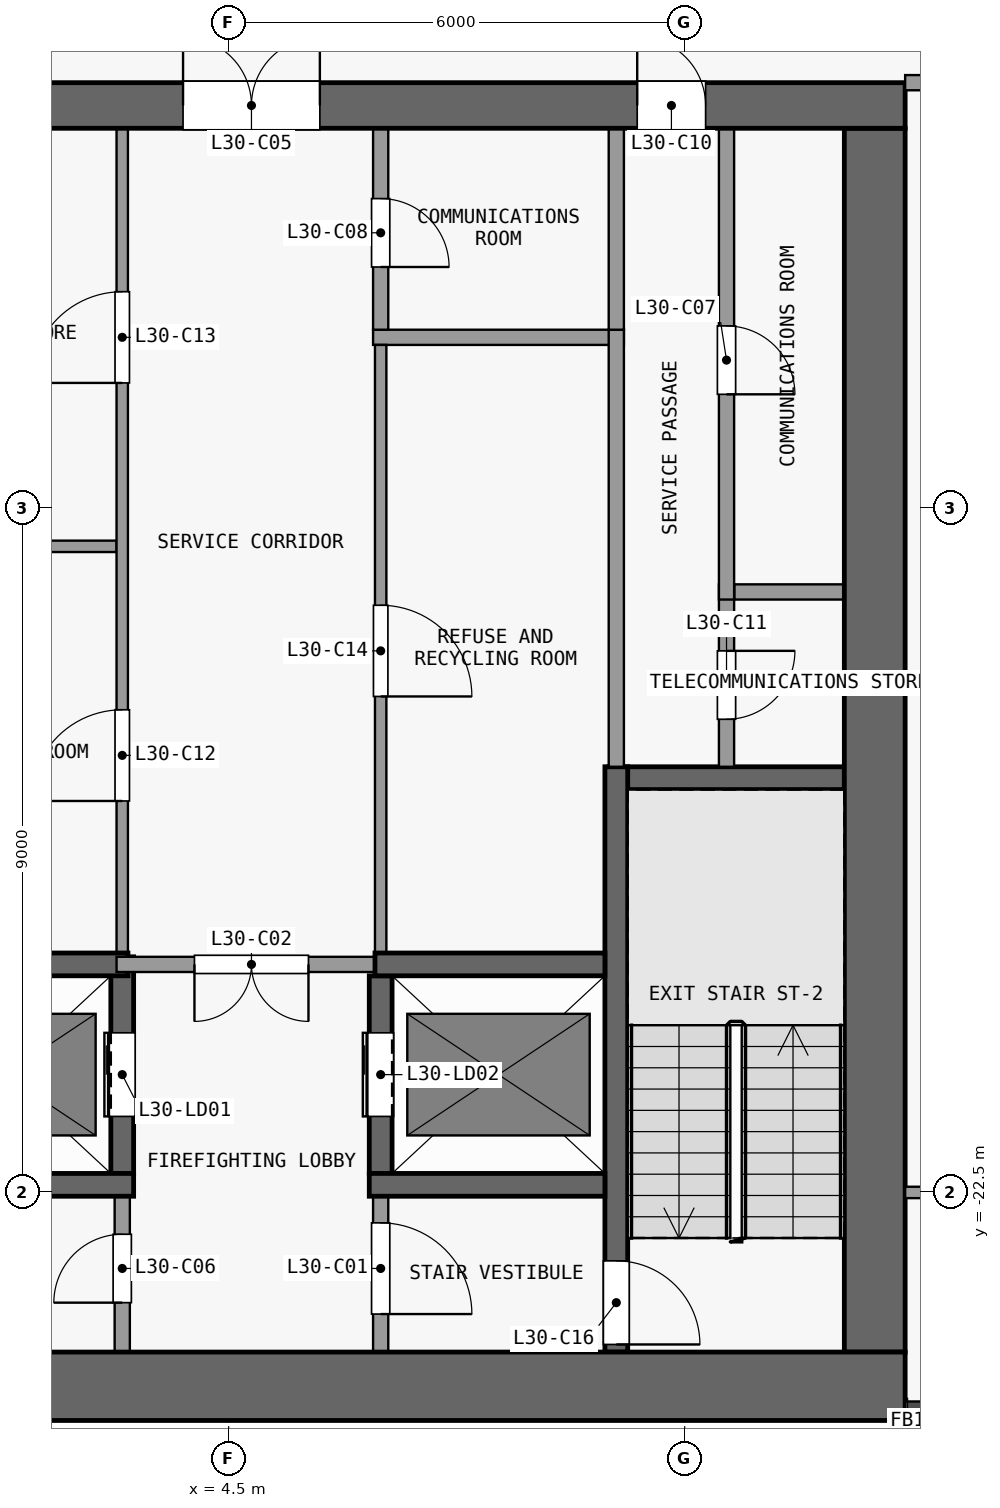
"""IFC4 building model, lengths in metres.
Left out: names, types, materials, properties, quantities, classifications, styles, units other than length and angle.
Written with IfcOpenShell. Run it as: python <this file> out.ifc"""

import sys

from ifc_helpers import new_model, si_unit, direction, frame, frame_2d, origin, place, context, subcontext, project, spatial, rectangle, extrude, element, fill, save


model = new_model("IFC4")
c1 = context("Model", 3, precision=1e-05, world=origin(), true_north=direction((0.0, 1.0)))
c2 = subcontext(c1, "Body", "Model", "MODEL_VIEW")
j1 = project(units=[si_unit("LENGTHUNIT", "METRE"), si_unit("PLANEANGLEUNIT", "RADIAN")], contexts=[c1])
p1 = place(None, origin())
s1 = spatial("IfcSite", under=j1, at=p1, CompositionType="ELEMENT")
p2 = place(p1, origin())
s2 = spatial("IfcBuilding", under=s1, at=p2, CompositionType="ELEMENT")
p3 = place(p2, frame((0.0, 0.0, 120.7)))
s3 = spatial("IfcBuildingStorey", under=s2, at=p3, CompositionType="ELEMENT", Elevation=120.7)
p4 = place(p3, frame((-13.4, -25.05, 0.0), z_axis=(0.0, 0.0, 1.0), x_axis=(1.0, 0.0, 0.0)))
e1 = element("IfcWall", 1, at=p4, inside=s3, PredefinedType="SHEAR", context=c2, shape_type="SweptSolid", body=[
    extrude(rectangle(XDim=26.8, YDim=0.9, at=frame_2d((13.4, 0.0))), origin(), (0.0, 0.0, 1.0), 3.3),
])
p5 = place(p3, frame((-13.4, -8.2, 0.0), z_axis=(0.0, 0.0, 1.0), x_axis=(1.0, 0.0, 0.0)))
e2 = element("IfcWall", 2, at=p5, inside=s3, PredefinedType="SHEAR", context=c2, shape_type="SweptSolid", body=[
    extrude(rectangle(XDim=26.8, YDim=0.6, at=frame_2d((13.4, 0.0))), origin(), (0.0, 0.0, 1.0), 3.3),
])
p6 = place(p5, frame((7.7, 0.0, 0.0)))
e3 = element("IfcOpeningElement", 3, at=p6, cuts=e2, PredefinedType="OPENING", context=c2, shape_type="SweptSolid", body=[
    extrude(rectangle(XDim=1.8, YDim=2.1, at=frame_2d((0.9, 1.05))), frame((0.0, 0.31, 0.0), z_axis=(0.0, -1.0, 0.0), x_axis=(1.0, 0.0, 0.0)), (0.0, 0.0, 1.0), 0.62),
])
p7 = place(p5, frame((17.3, 0.0, 0.0)))
e4 = element("IfcOpeningElement", 4, at=p7, cuts=e2, PredefinedType="OPENING", context=c2, shape_type="SweptSolid", body=[
    extrude(rectangle(XDim=1.8, YDim=2.1, at=frame_2d((0.9, 1.05))), frame((0.0, 0.31, 0.0), z_axis=(0.0, -1.0, 0.0), x_axis=(1.0, 0.0, 0.0)), (0.0, 0.0, 1.0), 0.62),
])
p8 = place(p5, frame((1.625, 0.0, 0.0)))
e5 = element("IfcOpeningElement", 5, at=p8, cuts=e2, PredefinedType="OPENING", context=c2, shape_type="SweptSolid", body=[
    extrude(rectangle(XDim=1.2, YDim=2.1, at=frame_2d((0.6, 1.05))), frame((0.0, 0.31, 0.0), z_axis=(0.0, -1.0, 0.0), x_axis=(1.0, 0.0, 0.0)), (0.0, 0.0, 1.0), 0.62),
])
p9 = place(p5, frame((23.275, 0.0, 0.0)))
e6 = element("IfcOpeningElement", 6, at=p9, cuts=e2, PredefinedType="OPENING", context=c2, shape_type="SweptSolid", body=[
    extrude(rectangle(XDim=0.9, YDim=2.1, at=frame_2d((0.45, 1.05))), frame((0.0, 0.31, 0.0), z_axis=(0.0, -1.0, 0.0), x_axis=(1.0, 0.0, 0.0)), (0.0, 0.0, 1.0), 0.62),
])
p10 = place(p3, frame((13.0, -24.6, 0.0), z_axis=(0.0, 0.0, 1.0), x_axis=(0.0, 1.0, 0.0)))
e7 = element("IfcWall", 7, at=p10, inside=s3, PredefinedType="SHEAR", context=c2, shape_type="SweptSolid", body=[
    extrude(rectangle(XDim=16.1, YDim=0.8, at=frame_2d((8.05, 0.0))), origin(), (0.0, 0.0, 1.0), 3.3),
])
p11 = place(p3, frame((-2.95, -22.4, 0.0), z_axis=(0.0, 0.0, 1.0), x_axis=(1.0, 0.0, 0.0)))
e8 = element("IfcWall", 8, at=p11, inside=s3, PredefinedType="SHEAR", context=c2, shape_type="SweptSolid", body=[
    extrude(rectangle(XDim=6.2, YDim=0.3, at=frame_2d((3.1, 0.0))), origin(), (0.0, 0.0, 1.0), 3.3),
])
p12 = place(p3, frame((6.35, -22.4, 0.0), z_axis=(0.0, 0.0, 1.0), x_axis=(1.0, 0.0, 0.0)))
e9 = element("IfcWall", 9, at=p12, inside=s3, PredefinedType="SHEAR", context=c2, shape_type="SweptSolid", body=[
    extrude(rectangle(XDim=3.1, YDim=0.3, at=frame_2d((1.55, 0.0))), origin(), (0.0, 0.0, 1.0), 3.3),
])
p13 = place(p3, frame((0.15, -19.5, 0.0), z_axis=(0.0, 0.0, 1.0), x_axis=(1.0, 0.0, 0.0)))
e10 = element("IfcWall", 10, at=p13, inside=s3, PredefinedType="SHEAR", context=c2, shape_type="SweptSolid", body=[
    extrude(rectangle(XDim=3.025, YDim=0.3, at=frame_2d((1.513, 0.0))), origin(), (0.0, 0.0, 1.0), 3.3),
])
p14 = place(p3, frame((6.575, -19.5, 0.0), z_axis=(0.0, 0.0, 1.0), x_axis=(-1.0, 0.0, 0.0)))
e11 = element("IfcWall", 11, at=p14, inside=s3, PredefinedType="PARTITIONING", context=c2, shape_type="SweptSolid", body=[
    extrude(rectangle(XDim=3.55, YDim=0.2, at=frame_2d((1.775, 0.0))), origin(), (0.0, 0.0, 1.0), 3.3),
])
p15 = place(p14, frame((1.025, 0.0, 0.0)))
e12 = element("IfcOpeningElement", 12, at=p15, cuts=e11, PredefinedType="OPENING", context=c2, shape_type="SweptSolid", body=[
    extrude(rectangle(XDim=1.5, YDim=2.1, at=frame_2d((0.75, 1.05))), frame((0.0, 0.11, 0.0), z_axis=(0.0, -1.0, 0.0), x_axis=(1.0, 0.0, 0.0)), (0.0, 0.0, 1.0), 0.22),
])
p16 = place(p3, frame((6.425, -19.5, 0.0), z_axis=(0.0, 0.0, 1.0), x_axis=(1.0, 0.0, 0.0)))
e13 = element("IfcWall", 13, at=p16, inside=s3, PredefinedType="SHEAR", context=c2, shape_type="SweptSolid", body=[
    extrude(rectangle(XDim=3.025, YDim=0.3, at=frame_2d((1.512, 0.0))), origin(), (0.0, 0.0, 1.0), 3.3),
])
p17 = place(p3, frame((9.5, -17.05, 0.0), z_axis=(0.0, 0.0, 1.0), x_axis=(1.0, 0.0, 0.0)))
e14 = element("IfcWall", 14, at=p17, inside=s3, PredefinedType="SHEAR", context=c2, shape_type="SweptSolid", body=[
    extrude(rectangle(XDim=3.1, YDim=0.3, at=frame_2d((1.55, 0.0))), origin(), (0.0, 0.0, 1.0), 3.3),
])
p18 = place(p3, frame((11.15, -14.6, 0.0), z_axis=(0.0, 0.0, 1.0), x_axis=(1.0, 0.0, 0.0)))
e15 = element("IfcWall", 15, at=p18, inside=s3, PredefinedType="PARTITIONING", context=c2, shape_type="SweptSolid", body=[
    extrude(rectangle(XDim=1.45, YDim=0.2, at=frame_2d((0.725, 0.0))), origin(), (0.0, 0.0, 1.0), 3.3),
])
p19 = place(p3, frame((0.15, -14.0, 0.0), z_axis=(0.0, 0.0, 1.0), x_axis=(1.0, 0.0, 0.0)))
e16 = element("IfcWall", 16, at=p19, inside=s3, PredefinedType="PARTITIONING", context=c2, shape_type="SweptSolid", body=[
    extrude(rectangle(XDim=2.875, YDim=0.15, at=frame_2d((1.438, 0.0))), origin(), (0.0, 0.0, 1.0), 3.3),
])
p20 = place(p3, frame((6.4, -11.25, 0.0), z_axis=(0.0, 0.0, 1.0), x_axis=(1.0, 0.0, 0.0)))
e17 = element("IfcWall", 17, at=p20, inside=s3, PredefinedType="PARTITIONING", context=c2, shape_type="SweptSolid", body=[
    extrude(rectangle(XDim=3.3, YDim=0.2, at=frame_2d((1.65, 0.0))), origin(), (0.0, 0.0, 1.0), 3.3),
])
p21 = place(p3, frame((3.1, -24.6, 0.0), z_axis=(0.0, 0.0, 1.0), x_axis=(0.0, 1.0, 0.0)))
e18 = element("IfcWall", 18, at=p21, inside=s3, PredefinedType="PARTITIONING", context=c2, shape_type="SweptSolid", body=[
    extrude(rectangle(XDim=2.05, YDim=0.2, at=frame_2d((1.025, 0.0))), origin(), (0.0, 0.0, 1.0), 3.3),
])
p22 = place(p21, frame((0.65, 0.0, 0.0)))
e19 = element("IfcOpeningElement", 19, at=p22, cuts=e18, PredefinedType="OPENING", context=c2, shape_type="SweptSolid", body=[
    extrude(rectangle(XDim=0.9, YDim=2.1, at=frame_2d((0.45, 1.05))), frame((0.0, 0.11, 0.0), z_axis=(0.0, -1.0, 0.0), x_axis=(1.0, 0.0, 0.0)), (0.0, 0.0, 1.0), 0.22),
])
p23 = place(p3, frame((3.1, -22.25, 0.0), z_axis=(0.0, 0.0, 1.0), x_axis=(0.0, 1.0, 0.0)))
e20 = element("IfcWall", 20, at=p23, inside=s3, PredefinedType="SHEAR", context=c2, shape_type="SweptSolid", body=[
    extrude(rectangle(XDim=2.85, YDim=0.3, at=frame_2d((1.425, 0.0))), origin(), (0.0, 0.0, 1.0), 3.3),
])
p24 = place(p23, frame((0.75, 0.0, 0.0)))
e21 = element("IfcOpeningElement", 21, at=p24, cuts=e20, PredefinedType="OPENING", context=c2, shape_type="SweptSolid", body=[
    extrude(rectangle(XDim=1.1, YDim=2.1, at=frame_2d((0.55, 1.05))), frame((0.0, 0.16, 0.0), z_axis=(0.0, -1.0, 0.0), x_axis=(1.0, 0.0, 0.0)), (0.0, 0.0, 1.0), 0.32),
])
p25 = place(p3, frame((3.1, -19.4, 0.0), z_axis=(0.0, 0.0, 1.0), x_axis=(0.0, 1.0, 0.0)))
e22 = element("IfcWall", 22, at=p25, inside=s3, PredefinedType="PARTITIONING", context=c2, shape_type="SweptSolid", body=[
    extrude(rectangle(XDim=10.9, YDim=0.15, at=frame_2d((5.45, 0.0))), origin(), (0.0, 0.0, 1.0), 3.3),
])
p26 = place(p25, frame((2.05, 0.0, 0.0)))
e23 = element("IfcOpeningElement", 23, at=p26, cuts=e22, PredefinedType="OPENING", context=c2, shape_type="SweptSolid", body=[
    extrude(rectangle(XDim=1.2, YDim=2.1, at=frame_2d((0.6, 1.05))), frame((0.0, 0.085, 0.0), z_axis=(0.0, -1.0, 0.0), x_axis=(1.0, 0.0, 0.0)), (0.0, 0.0, 1.0), 0.17),
])
p27 = place(p25, frame((7.55, 0.0, 0.0)))
e24 = element("IfcOpeningElement", 24, at=p27, cuts=e22, PredefinedType="OPENING", context=c2, shape_type="SweptSolid", body=[
    extrude(rectangle(XDim=1.2, YDim=2.1, at=frame_2d((0.6, 1.05))), frame((0.0, 0.085, 0.0), z_axis=(0.0, -1.0, 0.0), x_axis=(1.0, 0.0, 0.0)), (0.0, 0.0, 1.0), 0.17),
])
p28 = place(p3, frame((6.5, -22.55, 0.0), z_axis=(0.0, 0.0, 1.0), x_axis=(0.0, -1.0, 0.0)))
e25 = element("IfcWall", 25, at=p28, inside=s3, PredefinedType="PARTITIONING", context=c2, shape_type="SweptSolid", body=[
    extrude(rectangle(XDim=2.05, YDim=0.2, at=frame_2d((1.025, 0.0))), origin(), (0.0, 0.0, 1.0), 3.3),
])
p29 = place(p28, frame((0.35, 0.0, 0.0)))
e26 = element("IfcOpeningElement", 26, at=p29, cuts=e25, PredefinedType="OPENING", context=c2, shape_type="SweptSolid", body=[
    extrude(rectangle(XDim=1.2, YDim=2.1, at=frame_2d((0.6, 1.05))), frame((0.0, 0.11, 0.0), z_axis=(0.0, -1.0, 0.0), x_axis=(1.0, 0.0, 0.0)), (0.0, 0.0, 1.0), 0.22),
])
p30 = place(p3, frame((6.5, -22.25, 0.0), z_axis=(0.0, 0.0, 1.0), x_axis=(0.0, 1.0, 0.0)))
e27 = element("IfcWall", 27, at=p30, inside=s3, PredefinedType="SHEAR", context=c2, shape_type="SweptSolid", body=[
    extrude(rectangle(XDim=2.6, YDim=0.3, at=frame_2d((1.3, 0.0))), origin(), (0.0, 0.0, 1.0), 3.3),
])
p31 = place(p30, frame((0.75, 0.0, 0.0)))
e28 = element("IfcOpeningElement", 28, at=p31, cuts=e27, PredefinedType="OPENING", context=c2, shape_type="SweptSolid", body=[
    extrude(rectangle(XDim=1.1, YDim=2.1, at=frame_2d((0.55, 1.05))), frame((0.0, 0.16, 0.0), z_axis=(0.0, -1.0, 0.0), x_axis=(1.0, 0.0, 0.0)), (0.0, 0.0, 1.0), 0.32),
])
p32 = place(p3, frame((6.5, -11.35, 0.0), z_axis=(0.0, 0.0, 1.0), x_axis=(0.0, -1.0, 0.0)))
e29 = element("IfcWall", 29, at=p32, inside=s3, PredefinedType="PARTITIONING", context=c2, shape_type="SweptSolid", body=[
    extrude(rectangle(XDim=8.0, YDim=0.15, at=frame_2d((4.0, 0.0))), origin(), (0.0, 0.0, 1.0), 3.3),
])
p33 = place(p32, frame((3.425, 0.0, 0.0)))
e30 = element("IfcOpeningElement", 30, at=p33, cuts=e29, PredefinedType="OPENING", context=c2, shape_type="SweptSolid", body=[
    extrude(rectangle(XDim=1.2, YDim=2.1, at=frame_2d((0.6, 1.05))), frame((0.0, 0.085, 0.0), z_axis=(0.0, -1.0, 0.0), x_axis=(1.0, 0.0, 0.0)), (0.0, 0.0, 1.0), 0.17),
])
p34 = place(p3, frame((6.5, -8.5, 0.0), z_axis=(0.0, 0.0, 1.0), x_axis=(0.0, -1.0, 0.0)))
e31 = element("IfcWall", 31, at=p34, inside=s3, PredefinedType="PARTITIONING", context=c2, shape_type="SweptSolid", body=[
    extrude(rectangle(XDim=2.65, YDim=0.2, at=frame_2d((1.325, 0.0))), origin(), (0.0, 0.0, 1.0), 3.3),
])
p35 = place(p34, frame((0.925, 0.0, 0.0)))
e32 = element("IfcOpeningElement", 32, at=p35, cuts=e31, PredefinedType="OPENING", context=c2, shape_type="SweptSolid", body=[
    extrude(rectangle(XDim=0.9, YDim=2.1, at=frame_2d((0.45, 1.05))), frame((0.0, 0.11, 0.0), z_axis=(0.0, -1.0, 0.0), x_axis=(1.0, 0.0, 0.0)), (0.0, 0.0, 1.0), 0.22),
])
p36 = place(p3, frame((9.6, -16.9, 0.0), z_axis=(0.0, 0.0, 1.0), x_axis=(0.0, -1.0, 0.0)))
e33 = element("IfcWall", 33, at=p36, inside=s3, PredefinedType="SHEAR", context=c2, shape_type="SweptSolid", body=[
    extrude(rectangle(XDim=7.7, YDim=0.3, at=frame_2d((3.85, 0.0))), origin(), (0.0, 0.0, 1.0), 3.3),
])
p37 = place(p36, frame((6.5, 0.0, 0.0)))
e34 = element("IfcOpeningElement", 34, at=p37, cuts=e33, PredefinedType="OPENING", context=c2, shape_type="SweptSolid", body=[
    extrude(rectangle(XDim=1.1, YDim=2.1, at=frame_2d((0.55, 1.05))), frame((0.0, 0.16, 0.0), z_axis=(0.0, -1.0, 0.0), x_axis=(1.0, 0.0, 0.0)), (0.0, 0.0, 1.0), 0.32),
])
p38 = place(p3, frame((9.6, -16.9, 0.0), z_axis=(0.0, 0.0, 1.0), x_axis=(0.0, 1.0, 0.0)))
e35 = element("IfcWall", 35, at=p38, inside=s3, PredefinedType="PARTITIONING", context=c2, shape_type="SweptSolid", body=[
    extrude(rectangle(XDim=5.75, YDim=0.2, at=frame_2d((2.875, 0.0))), origin(), (0.0, 0.0, 1.0), 3.3),
])
p39 = place(p3, frame((9.6, -11.15, 0.0), z_axis=(0.0, 0.0, 1.0), x_axis=(0.0, 1.0, 0.0)))
e36 = element("IfcWall", 36, at=p39, inside=s3, PredefinedType="PARTITIONING", context=c2, shape_type="SweptSolid", body=[
    extrude(rectangle(XDim=2.65, YDim=0.2, at=frame_2d((1.325, 0.0))), origin(), (0.0, 0.0, 1.0), 3.3),
])
p40 = place(p3, frame((11.05, -14.5, 0.0), z_axis=(0.0, 0.0, 1.0), x_axis=(0.0, -1.0, 0.0)))
e37 = element("IfcWall", 37, at=p40, inside=s3, PredefinedType="PARTITIONING", context=c2, shape_type="SweptSolid", body=[
    extrude(rectangle(XDim=2.4, YDim=0.2, at=frame_2d((1.2, 0.0))), origin(), (0.0, 0.0, 1.0), 3.3),
])
p41 = place(p40, frame((0.875, 0.0, 0.0)))
e38 = element("IfcOpeningElement", 38, at=p41, cuts=e37, PredefinedType="OPENING", context=c2, shape_type="SweptSolid", body=[
    extrude(rectangle(XDim=0.9, YDim=2.1, at=frame_2d((0.45, 1.05))), frame((0.0, 0.11, 0.0), z_axis=(0.0, -1.0, 0.0), x_axis=(1.0, 0.0, 0.0)), (0.0, 0.0, 1.0), 0.22),
])
p42 = place(p3, frame((11.05, -8.5, 0.0), z_axis=(0.0, 0.0, 1.0), x_axis=(0.0, -1.0, 0.0)))
e39 = element("IfcWall", 39, at=p42, inside=s3, PredefinedType="PARTITIONING", context=c2, shape_type="SweptSolid", body=[
    extrude(rectangle(XDim=6.2, YDim=0.2, at=frame_2d((3.1, 0.0))), origin(), (0.0, 0.0, 1.0), 3.3),
])
p43 = place(p42, frame((2.6, 0.0, 0.0)))
e40 = element("IfcOpeningElement", 40, at=p43, cuts=e39, PredefinedType="OPENING", context=c2, shape_type="SweptSolid", body=[
    extrude(rectangle(XDim=0.9, YDim=2.1, at=frame_2d((0.45, 1.05))), frame((0.0, 0.11, 0.0), z_axis=(0.0, -1.0, 0.0), x_axis=(1.0, 0.0, 0.0)), (0.0, 0.0, 1.0), 0.22),
])
p44 = place(p3, frame((13.4, -22.5, 0.0), z_axis=(0.0, 0.0, 1.0), x_axis=(1.0, 0.0, 0.0)))
e41 = element("IfcWall", 41, at=p44, inside=s3, PredefinedType="PARTITIONING", context=c2, shape_type="SweptSolid", body=[
    extrude(rectangle(XDim=2.925, YDim=0.15, at=frame_2d((1.462, 0.0))), origin(), (0.0, 0.0, 1.0), 3.3),
])
p45 = place(p44, frame((1.0, 0.0, 0.0)))
e42 = element("IfcOpeningElement", 42, at=p45, cuts=e41, PredefinedType="OPENING", context=c2, shape_type="SweptSolid", body=[
    extrude(rectangle(XDim=0.9, YDim=2.1, at=frame_2d((0.45, 1.05))), frame((0.0, 0.085, 0.0), z_axis=(0.0, -1.0, 0.0), x_axis=(1.0, 0.0, 0.0)), (0.0, 0.0, 1.0), 0.17),
])
p46 = place(p3, frame((13.4, -7.9, 0.0), z_axis=(0.0, 0.0, 1.0), x_axis=(1.0, 0.0, 0.0)))
e43 = element("IfcWall", 43, at=p46, inside=s3, PredefinedType="PARTITIONING", context=c2, shape_type="SweptSolid", body=[
    extrude(rectangle(XDim=11.85, YDim=0.2, at=frame_2d((5.925, 0.0))), origin(), (0.0, 0.0, 1.0), 3.3),
])
p47 = place(p46, frame((1.0, 0.0, 0.0)))
e44 = element("IfcOpeningElement", 44, at=p47, cuts=e43, PredefinedType="OPENING", context=c2, shape_type="SweptSolid", body=[
    extrude(rectangle(XDim=1.0, YDim=2.1, at=frame_2d((0.5, 1.05))), frame((0.0, 0.11, 0.0), z_axis=(0.0, -1.0, 0.0), x_axis=(1.0, 0.0, 0.0)), (0.0, 0.0, 1.0), 0.22),
])
p48 = place(p24, origin())
e45 = element("IfcDoor", 45, at=p48, inside=s3, OperationType="DOUBLE_DOOR_SLIDING", PredefinedType="DOOR", context=c2, shape_type="SweptSolid", body=[
    extrude(rectangle(XDim=1.1, YDim=2.1, at=frame_2d((0.55, 1.05))), frame((0.0, 0.025, 0.0), z_axis=(0.0, -1.0, 0.0), x_axis=(1.0, 0.0, 0.0)), (0.0, 0.0, 1.0), 0.05),
])
fill(e21, e45)
p49 = place(p31, origin())
e46 = element("IfcDoor", 46, at=p49, inside=s3, OperationType="DOUBLE_DOOR_SLIDING", PredefinedType="DOOR", context=c2, shape_type="SweptSolid", body=[
    extrude(rectangle(XDim=1.1, YDim=2.1, at=frame_2d((0.55, 1.05))), frame((0.0, 0.025, 0.0), z_axis=(0.0, -1.0, 0.0), x_axis=(1.0, 0.0, 0.0)), (0.0, 0.0, 1.0), 0.05),
])
fill(e28, e46)
p50 = place(p29, origin())
e47 = element("IfcDoor", 47, at=p50, inside=s3, OperationType="SINGLE_SWING_RIGHT", PredefinedType="DOOR", context=c2, shape_type="SweptSolid", body=[
    extrude(rectangle(XDim=1.2, YDim=2.1, at=frame_2d((0.6, 1.05))), frame((0.0, 0.025, 0.0), z_axis=(0.0, -1.0, 0.0), x_axis=(1.0, 0.0, 0.0)), (0.0, 0.0, 1.0), 0.05),
])
fill(e26, e47)
p51 = place(p15, origin())
e48 = element("IfcDoor", 48, at=p51, inside=s3, OperationType="DOUBLE_DOOR_SINGLE_SWING", PredefinedType="DOOR", context=c2, shape_type="SweptSolid", body=[
    extrude(rectangle(XDim=1.5, YDim=2.1, at=frame_2d((0.75, 1.05))), frame((0.0, 0.025, 0.0), z_axis=(0.0, -1.0, 0.0), x_axis=(1.0, 0.0, 0.0)), (0.0, 0.0, 1.0), 0.05),
])
fill(e12, e48)
p52 = place(p7, origin())
e49 = element("IfcDoor", 49, at=p52, inside=s3, OperationType="DOUBLE_DOOR_SINGLE_SWING", PredefinedType="DOOR", context=c2, shape_type="SweptSolid", body=[
    extrude(rectangle(XDim=1.8, YDim=2.1, at=frame_2d((0.9, 1.05))), frame((0.0, 0.025, 0.0), z_axis=(0.0, -1.0, 0.0), x_axis=(1.0, 0.0, 0.0)), (0.0, 0.0, 1.0), 0.05),
])
fill(e4, e49)
p53 = place(p22, origin())
e50 = element("IfcDoor", 50, at=p53, inside=s3, OperationType="SINGLE_SWING_LEFT", PredefinedType="DOOR", context=c2, shape_type="SweptSolid", body=[
    extrude(rectangle(XDim=0.9, YDim=2.1, at=frame_2d((0.45, 1.05))), frame((0.0, 0.025, 0.0), z_axis=(0.0, -1.0, 0.0), x_axis=(1.0, 0.0, 0.0)), (0.0, 0.0, 1.0), 0.05),
])
fill(e19, e50)
p54 = place(p43, origin())
e51 = element("IfcDoor", 51, at=p54, inside=s3, OperationType="SINGLE_SWING_RIGHT", PredefinedType="DOOR", context=c2, shape_type="SweptSolid", body=[
    extrude(rectangle(XDim=0.9, YDim=2.1, at=frame_2d((0.45, 1.05))), frame((0.0, 0.025, 0.0), z_axis=(0.0, -1.0, 0.0), x_axis=(1.0, 0.0, 0.0)), (0.0, 0.0, 1.0), 0.05),
])
fill(e40, e51)
p55 = place(p35, origin())
e52 = element("IfcDoor", 52, at=p55, inside=s3, OperationType="SINGLE_SWING_RIGHT", PredefinedType="DOOR", context=c2, shape_type="SweptSolid", body=[
    extrude(rectangle(XDim=0.9, YDim=2.1, at=frame_2d((0.45, 1.05))), frame((0.0, 0.025, 0.0), z_axis=(0.0, -1.0, 0.0), x_axis=(1.0, 0.0, 0.0)), (0.0, 0.0, 1.0), 0.05),
])
fill(e32, e52)
p56 = place(p9, origin())
e53 = element("IfcDoor", 53, at=p56, inside=s3, OperationType="SINGLE_SWING_LEFT", PredefinedType="DOOR", context=c2, shape_type="SweptSolid", body=[
    extrude(rectangle(XDim=0.9, YDim=2.1, at=frame_2d((0.45, 1.05))), frame((0.0, 0.025, 0.0), z_axis=(0.0, -1.0, 0.0), x_axis=(1.0, 0.0, 0.0)), (0.0, 0.0, 1.0), 0.05),
])
fill(e6, e53)
p57 = place(p41, origin())
e54 = element("IfcDoor", 54, at=p57, inside=s3, OperationType="SINGLE_SWING_LEFT", PredefinedType="DOOR", context=c2, shape_type="SweptSolid", body=[
    extrude(rectangle(XDim=0.9, YDim=2.1, at=frame_2d((0.45, 1.05))), frame((0.0, 0.025, 0.0), z_axis=(0.0, -1.0, 0.0), x_axis=(1.0, 0.0, 0.0)), (0.0, 0.0, 1.0), 0.05),
])
fill(e38, e54)
p58 = place(p26, origin())
e55 = element("IfcDoor", 55, at=p58, inside=s3, OperationType="SINGLE_SWING_LEFT", PredefinedType="DOOR", context=c2, shape_type="SweptSolid", body=[
    extrude(rectangle(XDim=1.2, YDim=2.1, at=frame_2d((0.6, 1.05))), frame((0.0, 0.025, 0.0), z_axis=(0.0, -1.0, 0.0), x_axis=(1.0, 0.0, 0.0)), (0.0, 0.0, 1.0), 0.05),
])
fill(e23, e55)
p59 = place(p27, origin())
e56 = element("IfcDoor", 56, at=p59, inside=s3, OperationType="SINGLE_SWING_LEFT", PredefinedType="DOOR", context=c2, shape_type="SweptSolid", body=[
    extrude(rectangle(XDim=1.2, YDim=2.1, at=frame_2d((0.6, 1.05))), frame((0.0, 0.025, 0.0), z_axis=(0.0, -1.0, 0.0), x_axis=(1.0, 0.0, 0.0)), (0.0, 0.0, 1.0), 0.05),
])
fill(e24, e56)
p60 = place(p33, origin())
e57 = element("IfcDoor", 57, at=p60, inside=s3, OperationType="SINGLE_SWING_RIGHT", PredefinedType="DOOR", context=c2, shape_type="SweptSolid", body=[
    extrude(rectangle(XDim=1.2, YDim=2.1, at=frame_2d((0.6, 1.05))), frame((0.0, 0.025, 0.0), z_axis=(0.0, -1.0, 0.0), x_axis=(1.0, 0.0, 0.0)), (0.0, 0.0, 1.0), 0.05),
])
fill(e30, e57)
p61 = place(p37, origin())
e58 = element("IfcDoor", 58, at=p61, inside=s3, OperationType="SINGLE_SWING_RIGHT", PredefinedType="DOOR", context=c2, shape_type="SweptSolid", body=[
    extrude(rectangle(XDim=1.1, YDim=2.1, at=frame_2d((0.55, 1.05))), frame((0.0, 0.025, 0.0), z_axis=(0.0, -1.0, 0.0), x_axis=(1.0, 0.0, 0.0)), (0.0, 0.0, 1.0), 0.05),
])
fill(e34, e58)
save(model, sys.argv[1])
